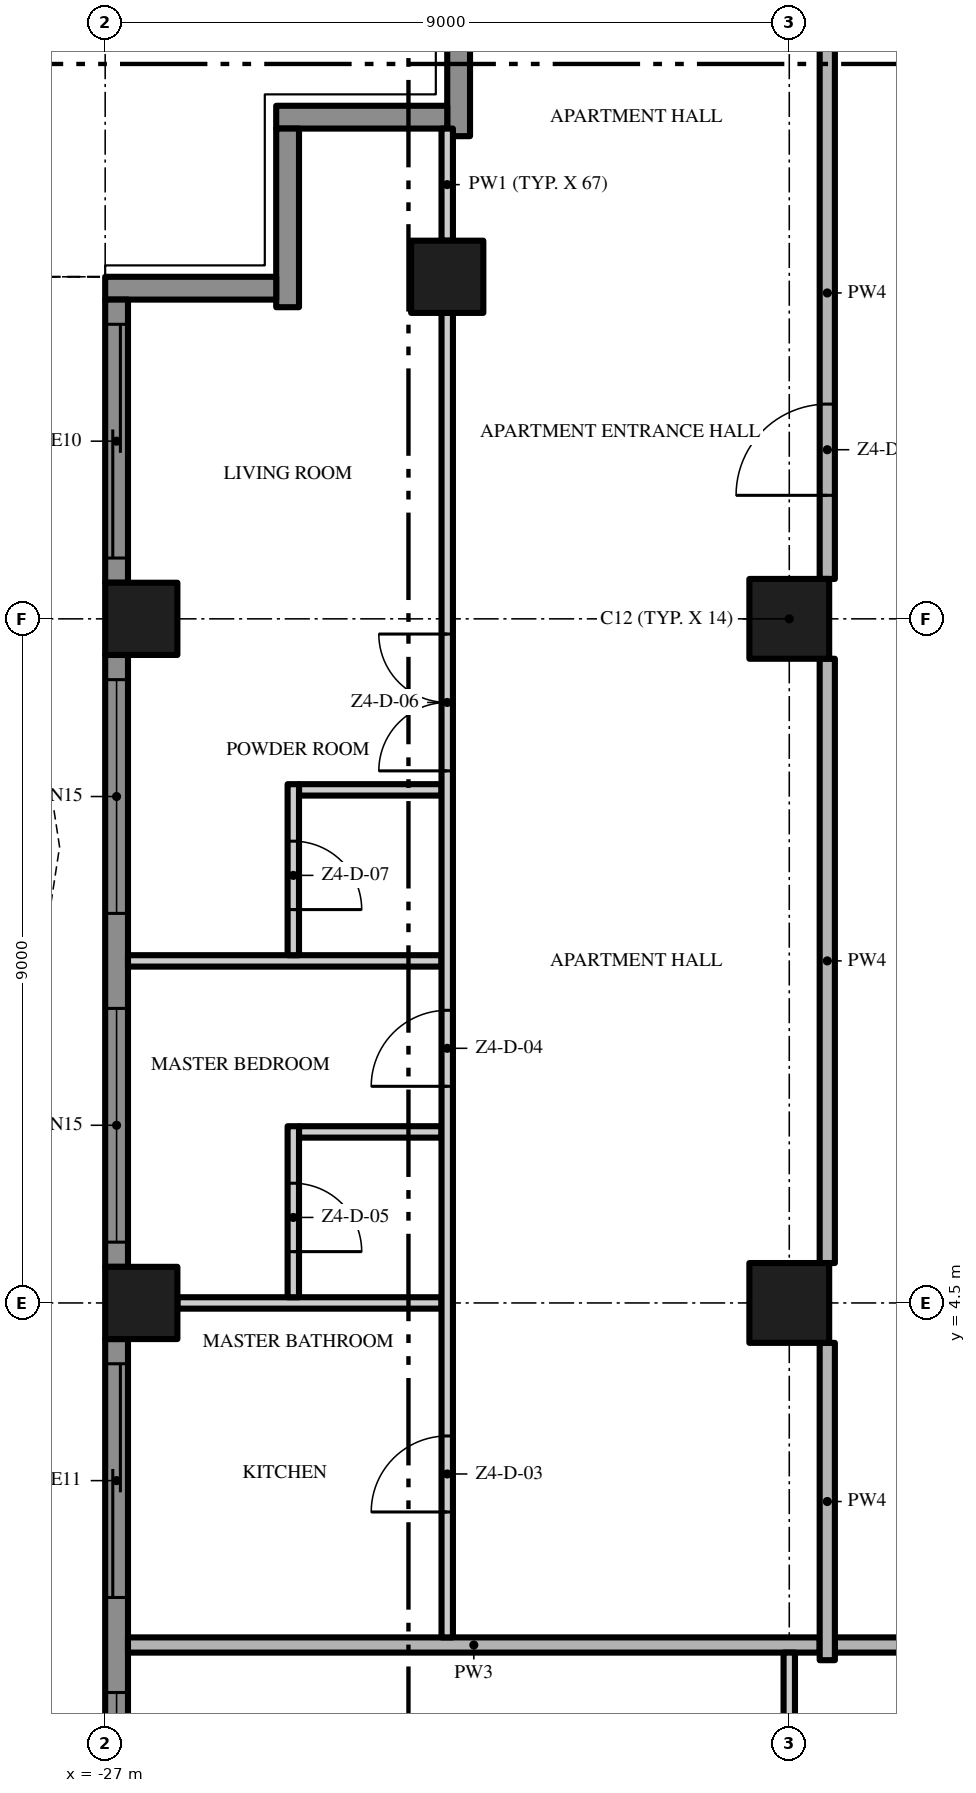
"""IFC4 building model, lengths in metres.
Left out: names, types, materials, properties, quantities, classifications, styles, units other than length and angle.
Written with IfcOpenShell. Run it as: python <this file> out.ifc"""

import sys

from ifc_helpers import new_model, si_unit, direction, frame, frame_2d, origin, origin_2d, place, context, subcontext, project, spatial, polyline, rectangle, outline, extrude, element, fill, save


model = new_model("IFC4")
c1 = context("Model", 3, precision=1e-05, world=origin(), true_north=direction((0.0, 1.0)))
c2 = subcontext(c1, "Body", "Model", "MODEL_VIEW")
j1 = project(units=[si_unit("LENGTHUNIT", "METRE"), si_unit("PLANEANGLEUNIT", "RADIAN")], contexts=[c1])
p1 = place(None, origin())
s1 = spatial("IfcSite", under=j1, at=p1, CompositionType="ELEMENT")
p2 = place(p1, origin())
s2 = spatial("IfcBuilding", under=s1, at=p2, CompositionType="ELEMENT")
p3 = place(p2, frame((0.0, 0.0, 218.6)))
s3 = spatial("IfcBuildingStorey", under=s2, at=p3, CompositionType="ELEMENT", Elevation=218.6)
for number, where, z_axis, x_axis in (
    (1, (-18.0, 13.5, 0.0), (0.0, 0.0, 1.0), (1.0, 0.0, 0.0)),
    (2, (-18.0, 4.5, 0.0), (0.0, 0.0, 1.0), (1.0, 0.0, 0.0)),
):
    element("IfcColumn", number, at=place(p3, frame(where, z_axis=z_axis, x_axis=x_axis)), inside=s3, PredefinedType="COLUMN", context=c2, shape_type="SweptSolid", body=[
        extrude(rectangle(XDim=1.05, YDim=1.05, at=origin_2d()), origin(), (0.0, 0.0, 1.0), 3.5),
    ])
for number, where, z_axis, x_axis in (
    (3, (-26.525, 13.5, 0.0), (0.0, 0.0, 1.0), (1.0, 0.0, 0.0)),
    (4, (-22.5, 18.0, 0.0), (0.0, 0.0, 1.0), (1.0, 0.0, 0.0)),
    (5, (-26.525, 4.5, 0.0), (0.0, 0.0, 1.0), (1.0, 0.0, 0.0)),
):
    element("IfcColumn", number, at=place(p3, frame(where, z_axis=z_axis, x_axis=x_axis)), inside=s3, PredefinedType="COLUMN", context=c2, shape_type="SweptSolid", body=[
        extrude(rectangle(XDim=0.95, YDim=0.95, at=origin_2d()), origin(), (0.0, 0.0, 1.0), 3.5),
    ])
p4 = place(p3, frame((-22.35, 19.85, 0.0), z_axis=(0.0, 0.0, 1.0), x_axis=(0.0, 1.0, 0.0)))
e6 = element("IfcWall", 6, at=p4, inside=s3, PredefinedType="SOLIDWALL", context=c2, shape_type="SweptSolid", body=[
    extrude(rectangle(XDim=2.35, YDim=0.3, at=frame_2d((1.175, 0.0))), origin(), (0.0, 0.0, 1.0), 3.5),
])
p5 = place(p3, frame((-24.75, 20.1, 0.0), z_axis=(0.0, 0.0, 1.0), x_axis=(1.0, 0.0, 0.0)))
e7 = element("IfcWall", 7, at=p5, inside=s3, PredefinedType="SOLIDWALL", context=c2, shape_type="SweptSolid", body=[
    extrude(rectangle(XDim=2.25, YDim=0.3, at=frame_2d((1.125, 0.0))), origin(), (0.0, 0.0, 1.0), 3.5),
])
p6 = place(p3, frame((-24.6, 17.6, 0.0), z_axis=(0.0, 0.0, 1.0), x_axis=(0.0, 1.0, 0.0)))
e8 = element("IfcWall", 8, at=p6, inside=s3, PredefinedType="SOLIDWALL", context=c2, shape_type="SweptSolid", body=[
    extrude(rectangle(XDim=2.35, YDim=0.3, at=frame_2d((1.175, 0.0))), origin(), (0.0, 0.0, 1.0), 3.5),
])
p7 = place(p3, frame((-27.0, 17.85, 0.0), z_axis=(0.0, 0.0, 1.0), x_axis=(1.0, 0.0, 0.0)))
e9 = element("IfcWall", 9, at=p7, inside=s3, PredefinedType="SOLIDWALL", context=c2, shape_type="SweptSolid", body=[
    extrude(rectangle(XDim=2.25, YDim=0.3, at=frame_2d((1.125, 0.0))), origin(), (0.0, 0.0, 1.0), 3.5),
])
p8 = place(p3, frame((-26.85, 13.975, 0.0), z_axis=(0.0, 0.0, 1.0), x_axis=(0.0, 1.0, 0.0)))
e10 = element("IfcWall", 10, at=p8, inside=s3, PredefinedType="SOLIDWALL", context=c2, shape_type="SweptSolid", body=[
    extrude(rectangle(XDim=3.725, YDim=0.3, at=frame_2d((1.863, 0.0))), origin(), (0.0, 0.0, 1.0), 3.5),
])
p9 = place(p8, frame((0.325, 0.0, 0.0)))
e11 = element("IfcOpeningElement", 11, at=p9, cuts=e10, PredefinedType="OPENING", context=c2, shape_type="SweptSolid", body=[
    extrude(rectangle(XDim=3.075, YDim=2.4, at=frame_2d((1.538, 1.2))), frame((0.0, 0.16, 0.0), z_axis=(0.0, -1.0, 0.0), x_axis=(1.0, 0.0, 0.0)), (0.0, 0.0, 1.0), 0.32),
])
p10 = place(p3, frame((-26.85, 4.975, 0.0), z_axis=(0.0, 0.0, 1.0), x_axis=(0.0, 1.0, 0.0)))
e12 = element("IfcWall", 12, at=p10, inside=s3, PredefinedType="SOLIDWALL", context=c2, shape_type="SweptSolid", body=[
    extrude(rectangle(XDim=8.05, YDim=0.3, at=frame_2d((4.025, 0.0))), origin(), (0.0, 0.0, 1.0), 3.5),
])
p11 = place(p10, frame((4.65, 0.0, 0.45)))
e13 = element("IfcOpeningElement", 13, at=p11, cuts=e12, PredefinedType="OPENING", context=c2, shape_type="SweptSolid", body=[
    extrude(rectangle(XDim=3.075, YDim=2.65, at=frame_2d((1.538, 1.325))), frame((0.0, 0.16, 0.0), z_axis=(0.0, -1.0, 0.0), x_axis=(1.0, 0.0, 0.0)), (0.0, 0.0, 1.0), 0.32),
])
p12 = place(p10, frame((0.325, 0.0, 0.45)))
e14 = element("IfcOpeningElement", 14, at=p12, cuts=e12, PredefinedType="OPENING", context=c2, shape_type="SweptSolid", body=[
    extrude(rectangle(XDim=3.075, YDim=2.65, at=frame_2d((1.538, 1.325))), frame((0.0, 0.16, 0.0), z_axis=(0.0, -1.0, 0.0), x_axis=(1.0, 0.0, 0.0)), (0.0, 0.0, 1.0), 0.32),
])
p13 = place(p3, frame((-26.85, -4.025, 0.0), z_axis=(0.0, 0.0, 1.0), x_axis=(0.0, 1.0, 0.0)))
e15 = element("IfcWall", 15, at=p13, inside=s3, PredefinedType="SOLIDWALL", context=c2, shape_type="SweptSolid", body=[
    extrude(rectangle(XDim=8.05, YDim=0.3, at=frame_2d((4.025, 0.0))), origin(), (0.0, 0.0, 1.0), 3.5),
])
p14 = place(p13, frame((4.65, 0.0, 0.0)))
e16 = element("IfcOpeningElement", 16, at=p14, cuts=e15, PredefinedType="OPENING", context=c2, shape_type="SweptSolid", body=[
    extrude(rectangle(XDim=3.075, YDim=2.4, at=frame_2d((1.538, 1.2))), frame((0.0, 0.16, 0.0), z_axis=(0.0, -1.0, 0.0), x_axis=(1.0, 0.0, 0.0)), (0.0, 0.0, 1.0), 0.32),
])
p15 = place(p13, frame((0.325, 0.0, 0.45)))
e17 = element("IfcOpeningElement", 17, at=p15, cuts=e15, PredefinedType="OPENING", context=c2, shape_type="SweptSolid", body=[
    extrude(rectangle(XDim=3.075, YDim=2.65, at=frame_2d((1.538, 1.325))), frame((0.0, 0.16, 0.0), z_axis=(0.0, -1.0, 0.0), x_axis=(1.0, 0.0, 0.0)), (0.0, 0.0, 1.0), 0.32),
])
p16 = place(p3, origin())
e18 = element("IfcWall", 18, at=p16, inside=s3, PredefinedType="USERDEFINED", context=c2, shape_type="SweptSolid", body=[
    extrude(outline(polyline([(-30.0, 18.0), (-29.771, 16.5), (-29.171, 15.0), (-28.429, 13.5), (-27.829, 12.0), (-27.6, 10.5), (-27.829, 9.0), (-28.429, 7.5), (-29.171, 6.0), (-29.771, 4.5), (-30.0, 3.0), (-29.771, 1.5), (-29.171, 0.0), (-28.429, -1.5), (-27.829, -3.0), (-27.6, -4.5), (-27.829, -6.0), (-28.429, -7.5), (-29.171, -9.0), (-29.771, -10.5), (-30.0, -12.0), (-29.771, -13.5), (-29.171, -15.0), (-28.429, -16.5), (-27.829, -18.0), (-27.597, -17.907), (-28.201, -16.398), (-28.942, -14.898), (-29.528, -13.434), (-29.747, -12.0), (-29.528, -10.566), (-28.942, -9.102), (-28.201, -7.602), (-27.586, -6.066), (-27.347, -4.5), (-27.586, -2.934), (-28.201, -1.398), (-28.942, 0.102), (-29.528, 1.566), (-29.747, 3.0), (-29.528, 4.434), (-28.942, 5.898), (-28.201, 7.398), (-27.586, 8.934), (-27.347, 10.5), (-27.586, 12.066), (-28.201, 13.602), (-28.942, 15.102), (-29.528, 16.566), (-29.753, 18.038), (-30.0, 18.0)])), origin(), (0.0, 0.0, 1.0), 0.9),
])
p17 = place(p3, frame((-17.4, 0.0, 0.0), z_axis=(0.0, 0.0, 1.0), x_axis=(1.0, 0.0, 0.0)))
e19 = element("IfcWall", 19, at=p17, inside=s3, PredefinedType="PARTITIONING", context=c2, shape_type="SweptSolid", body=[
    extrude(rectangle(XDim=12.8, YDim=0.2, at=frame_2d((6.4, 0.0))), origin(), (0.0, 0.0, 1.0), 3.5),
])
p18 = place(p3, frame((-26.7, 0.0, 0.0), z_axis=(0.0, 0.0, 1.0), x_axis=(1.0, 0.0, 0.0)))
e20 = element("IfcWall", 20, at=p18, inside=s3, PredefinedType="PARTITIONING", context=c2, shape_type="SweptSolid", body=[
    extrude(rectangle(XDim=9.1, YDim=0.2, at=frame_2d((4.55, 0.0))), origin(), (0.0, 0.0, 1.0), 3.5),
])
p19 = place(p3, frame((-26.05, 4.5, 0.0), z_axis=(0.0, 0.0, 1.0), x_axis=(1.0, 0.0, 0.0)))
e21 = element("IfcWall", 21, at=p19, inside=s3, PredefinedType="PARTITIONING", context=c2, shape_type="SweptSolid", body=[
    extrude(rectangle(XDim=3.475, YDim=0.15, at=frame_2d((1.738, 0.0))), origin(), (0.0, 0.0, 1.0), 3.5),
])
p20 = place(p3, frame((-24.45, 6.75, 0.0), z_axis=(0.0, 0.0, 1.0), x_axis=(1.0, 0.0, 0.0)))
e22 = element("IfcWall", 22, at=p20, inside=s3, PredefinedType="PARTITIONING", context=c2, shape_type="SweptSolid", body=[
    extrude(rectangle(XDim=1.875, YDim=0.15, at=frame_2d((0.938, 0.0))), origin(), (0.0, 0.0, 1.0), 3.5),
])
p21 = place(p3, frame((-26.7, 9.0, 0.0), z_axis=(0.0, 0.0, 1.0), x_axis=(1.0, 0.0, 0.0)))
e23 = element("IfcWall", 23, at=p21, inside=s3, PredefinedType="PARTITIONING", context=c2, shape_type="SweptSolid", body=[
    extrude(rectangle(XDim=4.125, YDim=0.15, at=frame_2d((2.062, 0.0))), origin(), (0.0, 0.0, 1.0), 3.5),
])
p22 = place(p3, frame((-24.45, 11.25, 0.0), z_axis=(0.0, 0.0, 1.0), x_axis=(1.0, 0.0, 0.0)))
e24 = element("IfcWall", 24, at=p22, inside=s3, PredefinedType="PARTITIONING", context=c2, shape_type="SweptSolid", body=[
    extrude(rectangle(XDim=1.875, YDim=0.15, at=frame_2d((0.938, 0.0))), origin(), (0.0, 0.0, 1.0), 3.5),
])
p23 = place(p3, frame((-24.525, 6.825, 0.0), z_axis=(0.0, 0.0, 1.0), x_axis=(0.0, -1.0, 0.0)))
e25 = element("IfcWall", 25, at=p23, inside=s3, PredefinedType="PARTITIONING", context=c2, shape_type="SweptSolid", body=[
    extrude(rectangle(XDim=2.25, YDim=0.15, at=frame_2d((1.125, 0.0))), origin(), (0.0, 0.0, 1.0), 3.5),
])
p24 = place(p23, frame((0.75, 0.0, 0.0)))
e26 = element("IfcOpeningElement", 26, at=p24, cuts=e25, PredefinedType="OPENING", context=c2, shape_type="SweptSolid", body=[
    extrude(rectangle(XDim=0.9, YDim=2.1, at=frame_2d((0.45, 1.05))), frame((0.0, 0.085, 0.0), z_axis=(0.0, -1.0, 0.0), x_axis=(1.0, 0.0, 0.0)), (0.0, 0.0, 1.0), 0.17),
])
p25 = place(p3, frame((-24.525, 11.325, 0.0), z_axis=(0.0, 0.0, 1.0), x_axis=(0.0, -1.0, 0.0)))
e27 = element("IfcWall", 27, at=p25, inside=s3, PredefinedType="PARTITIONING", context=c2, shape_type="SweptSolid", body=[
    extrude(rectangle(XDim=2.25, YDim=0.15, at=frame_2d((1.125, 0.0))), origin(), (0.0, 0.0, 1.0), 3.5),
])
p26 = place(p25, frame((0.75, 0.0, 0.0)))
e28 = element("IfcOpeningElement", 28, at=p26, cuts=e27, PredefinedType="OPENING", context=c2, shape_type="SweptSolid", body=[
    extrude(rectangle(XDim=0.9, YDim=2.1, at=frame_2d((0.45, 1.05))), frame((0.0, 0.085, 0.0), z_axis=(0.0, -1.0, 0.0), x_axis=(1.0, 0.0, 0.0)), (0.0, 0.0, 1.0), 0.17),
])
p27 = place(p3, frame((-22.5, 0.1, 0.0), z_axis=(0.0, 0.0, 1.0), x_axis=(0.0, 1.0, 0.0)))
e29 = element("IfcWall", 29, at=p27, inside=s3, PredefinedType="PARTITIONING", context=c2, shape_type="SweptSolid", body=[
    extrude(rectangle(XDim=17.425, YDim=0.15, at=frame_2d((8.713, 0.0))), origin(), (0.0, 0.0, 1.0), 3.5),
])
p28 = place(p27, frame((1.65, 0.0, 0.0)))
e30 = element("IfcOpeningElement", 30, at=p28, cuts=e29, PredefinedType="OPENING", context=c2, shape_type="SweptSolid", body=[
    extrude(rectangle(XDim=1.0, YDim=2.4, at=frame_2d((0.5, 1.2))), frame((0.0, 0.085, 0.0), z_axis=(0.0, -1.0, 0.0), x_axis=(1.0, 0.0, 0.0)), (0.0, 0.0, 1.0), 0.17),
])
p29 = place(p27, frame((7.25, 0.0, 0.0)))
e31 = element("IfcOpeningElement", 31, at=p29, cuts=e29, PredefinedType="OPENING", context=c2, shape_type="SweptSolid", body=[
    extrude(rectangle(XDim=1.0, YDim=2.4, at=frame_2d((0.5, 1.2))), frame((0.0, 0.085, 0.0), z_axis=(0.0, -1.0, 0.0), x_axis=(1.0, 0.0, 0.0)), (0.0, 0.0, 1.0), 0.17),
])
p30 = place(p27, frame((11.4, 0.0, 0.0)))
e32 = element("IfcOpeningElement", 32, at=p30, cuts=e29, PredefinedType="OPENING", context=c2, shape_type="SweptSolid", body=[
    extrude(rectangle(XDim=1.8, YDim=2.4, at=frame_2d((0.9, 1.2))), frame((0.0, 0.085, 0.0), z_axis=(0.0, -1.0, 0.0), x_axis=(1.0, 0.0, 0.0)), (0.0, 0.0, 1.0), 0.17),
])
p31 = place(p3, frame((-22.5, 18.475, 0.0), z_axis=(0.0, 0.0, 1.0), x_axis=(0.0, 1.0, 0.0)))
e33 = element("IfcWall", 33, at=p31, inside=s3, PredefinedType="PARTITIONING", context=c2, shape_type="SweptSolid", body=[
    extrude(rectangle(XDim=1.475, YDim=0.15, at=frame_2d((0.738, 0.0))), origin(), (0.0, 0.0, 1.0), 3.5),
])
p32 = place(p3, frame((-18.0, -3.975, 0.0), z_axis=(0.0, 0.0, 1.0), x_axis=(0.0, 1.0, 0.0)))
e34 = element("IfcWall", 34, at=p32, inside=s3, PredefinedType="PARTITIONING", context=c2, shape_type="SweptSolid", body=[
    extrude(rectangle(XDim=3.875, YDim=0.15, at=frame_2d((1.938, 0.0))), origin(), (0.0, 0.0, 1.0), 3.5),
])
p33 = place(p32, frame((1.0, 0.0, 0.0)))
e35 = element("IfcOpeningElement", 35, at=p33, cuts=e34, PredefinedType="OPENING", context=c2, shape_type="SweptSolid", body=[
    extrude(rectangle(XDim=1.5, YDim=2.4, at=frame_2d((0.75, 1.2))), frame((0.0, 0.085, 0.0), z_axis=(0.0, -1.0, 0.0), x_axis=(1.0, 0.0, 0.0)), (0.0, 0.0, 1.0), 0.17),
])
p34 = place(p3, frame((-17.5, -0.2, 0.0), z_axis=(0.0, 0.0, 1.0), x_axis=(0.0, 1.0, 0.0)))
e36 = element("IfcWall", 36, at=p34, inside=s3, PredefinedType="PARTITIONING", context=c2, shape_type="SweptSolid", body=[
    extrude(rectangle(XDim=4.175, YDim=0.2, at=frame_2d((2.087, 0.0))), origin(), (0.0, 0.0, 1.0), 3.5),
])
p35 = place(p3, frame((-17.5, 5.025, 0.0), z_axis=(0.0, 0.0, 1.0), x_axis=(0.0, 1.0, 0.0)))
e37 = element("IfcWall", 37, at=p35, inside=s3, PredefinedType="PARTITIONING", context=c2, shape_type="SweptSolid", body=[
    extrude(rectangle(XDim=7.95, YDim=0.2, at=frame_2d((3.975, 0.0))), origin(), (0.0, 0.0, 1.0), 3.5),
])
p36 = place(p3, frame((-17.5, 14.025, 0.0), z_axis=(0.0, 0.0, 1.0), x_axis=(0.0, 1.0, 0.0)))
e38 = element("IfcWall", 38, at=p36, inside=s3, PredefinedType="PARTITIONING", context=c2, shape_type="SweptSolid", body=[
    extrude(rectangle(XDim=7.525, YDim=0.2, at=frame_2d((3.763, 0.0))), origin(), (0.0, 0.0, 1.0), 3.5),
])
p37 = place(p36, frame((1.1, 0.0, 0.0)))
e39 = element("IfcOpeningElement", 39, at=p37, cuts=e38, PredefinedType="OPENING", context=c2, shape_type="SweptSolid", body=[
    extrude(rectangle(XDim=1.2, YDim=2.4, at=frame_2d((0.6, 1.2))), frame((0.0, 0.11, 0.0), z_axis=(0.0, -1.0, 0.0), x_axis=(1.0, 0.0, 0.0)), (0.0, 0.0, 1.0), 0.22),
])
p38 = place(p9, origin())
e40 = element("IfcDoor", 40, at=p38, inside=s3, OperationType="SINGLE_SWING_LEFT", PredefinedType="DOOR", context=c2, shape_type="SweptSolid", body=[
    extrude(rectangle(XDim=3.075, YDim=2.4, at=frame_2d((1.538, 1.2))), frame((0.0, 0.025, 0.0), z_axis=(0.0, -1.0, 0.0), x_axis=(1.0, 0.0, 0.0)), (0.0, 0.0, 1.0), 0.05),
])
fill(e11, e40)
p39 = place(p11, origin())
e41 = element("IfcWindow", 41, at=p39, inside=s3, PartitioningType="SINGLE_PANEL", PredefinedType="WINDOW", context=c2, shape_type="SweptSolid", body=[
    extrude(rectangle(XDim=3.075, YDim=2.65, at=frame_2d((1.538, 1.325))), frame((0.0, 0.03, 0.0), z_axis=(0.0, -1.0, 0.0), x_axis=(1.0, 0.0, 0.0)), (0.0, 0.0, 1.0), 0.06),
])
fill(e13, e41)
p40 = place(p12, origin())
e42 = element("IfcWindow", 42, at=p40, inside=s3, PartitioningType="SINGLE_PANEL", PredefinedType="WINDOW", context=c2, shape_type="SweptSolid", body=[
    extrude(rectangle(XDim=3.075, YDim=2.65, at=frame_2d((1.538, 1.325))), frame((0.0, 0.03, 0.0), z_axis=(0.0, -1.0, 0.0), x_axis=(1.0, 0.0, 0.0)), (0.0, 0.0, 1.0), 0.06),
])
fill(e14, e42)
p41 = place(p14, origin())
e43 = element("IfcDoor", 43, at=p41, inside=s3, OperationType="SINGLE_SWING_LEFT", PredefinedType="DOOR", context=c2, shape_type="SweptSolid", body=[
    extrude(rectangle(XDim=3.075, YDim=2.4, at=frame_2d((1.538, 1.2))), frame((0.0, 0.025, 0.0), z_axis=(0.0, -1.0, 0.0), x_axis=(1.0, 0.0, 0.0)), (0.0, 0.0, 1.0), 0.05),
])
fill(e16, e43)
p42 = place(p15, origin())
e44 = element("IfcWindow", 44, at=p42, inside=s3, PartitioningType="SINGLE_PANEL", PredefinedType="WINDOW", context=c2, shape_type="SweptSolid", body=[
    extrude(rectangle(XDim=3.075, YDim=2.65, at=frame_2d((1.538, 1.325))), frame((0.0, 0.03, 0.0), z_axis=(0.0, -1.0, 0.0), x_axis=(1.0, 0.0, 0.0)), (0.0, 0.0, 1.0), 0.06),
])
fill(e17, e44)
p43 = place(p37, origin())
e45 = element("IfcDoor", 45, at=p43, inside=s3, OperationType="SINGLE_SWING_LEFT", PredefinedType="DOOR", context=c2, shape_type="SweptSolid", body=[
    extrude(rectangle(XDim=1.2, YDim=2.4, at=frame_2d((0.6, 1.2))), frame((0.0, 0.025, 0.0), z_axis=(0.0, -1.0, 0.0), x_axis=(1.0, 0.0, 0.0)), (0.0, 0.0, 1.0), 0.05),
])
fill(e39, e45)
p44 = place(p28, origin())
e46 = element("IfcDoor", 46, at=p44, inside=s3, OperationType="SINGLE_SWING_LEFT", PredefinedType="DOOR", context=c2, shape_type="SweptSolid", body=[
    extrude(rectangle(XDim=1.0, YDim=2.4, at=frame_2d((0.5, 1.2))), frame((0.0, 0.025, 0.0), z_axis=(0.0, -1.0, 0.0), x_axis=(1.0, 0.0, 0.0)), (0.0, 0.0, 1.0), 0.05),
])
fill(e30, e46)
p45 = place(p29, origin())
e47 = element("IfcDoor", 47, at=p45, inside=s3, OperationType="SINGLE_SWING_LEFT", PredefinedType="DOOR", context=c2, shape_type="SweptSolid", body=[
    extrude(rectangle(XDim=1.0, YDim=2.4, at=frame_2d((0.5, 1.2))), frame((0.0, 0.025, 0.0), z_axis=(0.0, -1.0, 0.0), x_axis=(1.0, 0.0, 0.0)), (0.0, 0.0, 1.0), 0.05),
])
fill(e31, e47)
p46 = place(p24, origin())
e48 = element("IfcDoor", 48, at=p46, inside=s3, OperationType="SINGLE_SWING_RIGHT", PredefinedType="DOOR", context=c2, shape_type="SweptSolid", body=[
    extrude(rectangle(XDim=0.9, YDim=2.1, at=frame_2d((0.45, 1.05))), frame((0.0, 0.025, 0.0), z_axis=(0.0, -1.0, 0.0), x_axis=(1.0, 0.0, 0.0)), (0.0, 0.0, 1.0), 0.05),
])
fill(e26, e48)
p47 = place(p30, origin())
e49 = element("IfcDoor", 49, at=p47, inside=s3, OperationType="DOUBLE_DOOR_SINGLE_SWING", PredefinedType="DOOR", context=c2, shape_type="SweptSolid", body=[
    extrude(rectangle(XDim=1.8, YDim=2.4, at=frame_2d((0.9, 1.2))), frame((0.0, 0.025, 0.0), z_axis=(0.0, -1.0, 0.0), x_axis=(1.0, 0.0, 0.0)), (0.0, 0.0, 1.0), 0.05),
])
fill(e32, e49)
p48 = place(p26, origin())
e50 = element("IfcDoor", 50, at=p48, inside=s3, OperationType="SINGLE_SWING_RIGHT", PredefinedType="DOOR", context=c2, shape_type="SweptSolid", body=[
    extrude(rectangle(XDim=0.9, YDim=2.1, at=frame_2d((0.45, 1.05))), frame((0.0, 0.025, 0.0), z_axis=(0.0, -1.0, 0.0), x_axis=(1.0, 0.0, 0.0)), (0.0, 0.0, 1.0), 0.05),
])
fill(e28, e50)
save(model, sys.argv[1])
